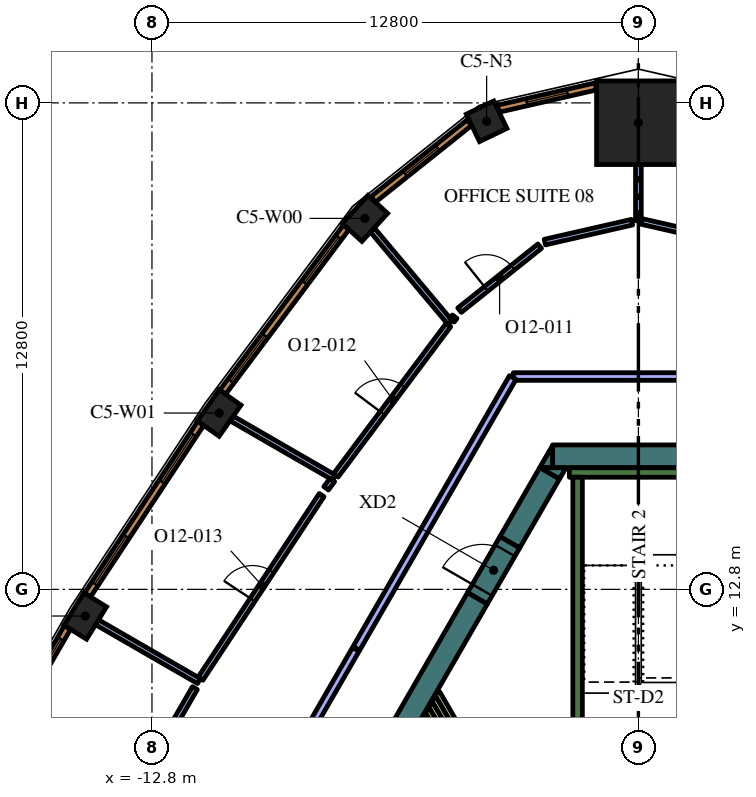
"""IFC4 building model, lengths in metres.
Left out: names, types, materials, properties, quantities, classifications, styles, units other than length and angle.
Written with IfcOpenShell. Run it as: python <this file> out.ifc"""

import sys

from ifc_helpers import new_model, si_unit, direction, frame, frame_2d, origin, origin_2d, place, context, subcontext, project, spatial, polyline, rectangle, outline, extrude, element, fill, save


model = new_model("IFC4")
c1 = context("Model", 3, precision=1e-05, world=origin(), true_north=direction((0.0, 1.0)))
c2 = subcontext(c1, "Body", "Model", "MODEL_VIEW")
j1 = project(units=[si_unit("LENGTHUNIT", "METRE"), si_unit("PLANEANGLEUNIT", "RADIAN")], contexts=[c1])
p1 = place(None, origin())
s1 = spatial("IfcSite", under=j1, at=p1, CompositionType="ELEMENT")
p2 = place(p1, origin())
s2 = spatial("IfcBuilding", under=s1, at=p2, CompositionType="ELEMENT")
p3 = place(p2, frame((0.0, 0.0, 279.6)))
s3 = spatial("IfcBuildingStorey", under=s2, at=p3, CompositionType="ELEMENT", Elevation=279.6)
p4 = place(p3, frame((0.0, 25.078, 0.0), z_axis=(0.0, 0.0, 1.0), x_axis=(0.0, 1.0, 0.0)))
e1 = element("IfcColumn", 1, at=p4, inside=s3, PredefinedType="COLUMN", context=c2, shape_type="SweptSolid", body=[
    extrude(rectangle(XDim=2.2, YDim=2.2, at=origin_2d()), origin(), (0.0, 0.0, 1.0), 4.2),
])
p5 = place(p3, frame((-3.993, 25.116, 0.0), z_axis=(0.0, 0.0, 1.0), x_axis=(-0.900873321869, -0.434082086644, 0.0)))
e2 = element("IfcColumn", 2, at=p5, inside=s3, PredefinedType="COLUMN", context=c2, shape_type="SweptSolid", body=[
    extrude(rectangle(XDim=0.8, YDim=0.8, at=origin_2d()), origin(), (0.0, 0.0, 1.0), 4.2),
])
for number, where, z_axis, x_axis in (
    (3, (-7.195, 22.561, 0.0), (0.0, 0.0, 1.0), (-0.676, -0.737, 0.0)),
    (4, (-11.032, 17.44, 0.0), (0.0, 0.0, 1.0), (-0.575, -0.818, 0.0)),
    (5, (-14.556, 12.098, 0.0), (0.0, 0.0, 1.0), (-0.526, -0.851, 0.0)),
):
    element("IfcColumn", number, at=place(p3, frame(where, z_axis=z_axis, x_axis=x_axis)), inside=s3, PredefinedType="COLUMN", context=c2, shape_type="SweptSolid", body=[
        extrude(rectangle(XDim=1.0, YDim=0.7, at=origin_2d()), origin(), (0.0, 0.0, 1.0), 4.2),
    ])
p6 = place(p3, frame((-2.258, 16.3, 0.0), z_axis=(0.0, 0.0, 1.0), x_axis=(1.0, 0.0, 0.0)))
e6 = element("IfcWall", 6, at=p6, inside=s3, PredefinedType="SOLIDWALL", context=c2, shape_type="SweptSolid", body=[
    extrude(rectangle(XDim=3.823, YDim=0.6, at=frame_2d((1.912, 0.0))), origin(), (0.0, 0.0, 1.0), 4.2),
])
p7 = place(p3, origin())
e7 = element("IfcWall", 7, at=p7, inside=s3, PredefinedType="SOLIDWALL", context=c2, shape_type="SweptSolid", body=[
    extrude(outline(polyline([(-2.598, 16.0), (-2.26, 16.585), (-2.26, 16.0), (-2.598, 16.0)])), origin(), (0.0, 0.0, 1.0), 4.2),
])
p8 = place(p3, frame((-2.335, 15.855, 0.0), z_axis=(0.0, 0.0, 1.0), x_axis=(-0.499980971027, -0.866036389889, 0.0)))
e8 = element("IfcWall", 8, at=p8, inside=s3, PredefinedType="SOLIDWALL", context=c2, shape_type="SweptSolid", body=[
    extrude(rectangle(XDim=2.098, YDim=0.6, at=frame_2d((1.049, 0.0))), origin(), (0.0, 0.0, 1.0), 4.2),
])
e9 = element("IfcWall", 9, at=p7, inside=s3, PredefinedType="SOLIDWALL", context=c2, shape_type="SweptSolid", body=[
    extrude(outline(polyline([(-1.905, 16.0), (-2.074, 15.707), (-2.581, 16.0), (-1.905, 16.0)])), origin(), (0.0, 0.0, 1.0), 4.2),
])
p9 = place(p3, frame((-4.234, 12.566, 0.0), z_axis=(0.0, 0.0, 1.0), x_axis=(-0.499998841866, -0.866026072432, 0.0)))
e10 = element("IfcWall", 10, at=p9, inside=s3, PredefinedType="SOLIDWALL", context=c2, shape_type="SweptSolid", body=[
    extrude(rectangle(XDim=16.694, YDim=0.6, at=frame_2d((8.347, 0.0))), origin(), (0.0, 0.0, 1.0), 4.2),
])
p10 = place(p3, frame((-1.817, 15.875, 0.0), z_axis=(0.0, 0.0, 1.0), x_axis=(1.0, 0.0, 0.0)))
e11 = element("IfcWall", 11, at=p10, inside=s3, PredefinedType="SOLIDWALL", context=c2, shape_type="SweptSolid", body=[
    extrude(rectangle(XDim=3.634, YDim=0.25, at=frame_2d((1.817, 0.0))), origin(), (0.0, 0.0, 1.0), 4.2),
])
p11 = place(p3, frame((-1.6, 8.7, 0.0), z_axis=(0.0, 0.0, 1.0), x_axis=(0.0, 1.0, 0.0)))
e12 = element("IfcWall", 12, at=p11, inside=s3, PredefinedType="SOLIDWALL", context=c2, shape_type="SweptSolid", body=[
    extrude(rectangle(XDim=7.05, YDim=0.25, at=frame_2d((3.525, 0.0))), origin(), (0.0, 0.0, 1.0), 4.2),
])
p12 = place(p3, frame((-5.294, 10.067, 0.0), z_axis=(0.0, 0.0, 1.0), x_axis=(0.500054140411, -0.865994143547, 0.0)))
e13 = element("IfcWall", 13, at=p12, inside=s3, PredefinedType="PARTITIONING", context=c2, shape_type="SweptSolid", body=[
    extrude(rectangle(XDim=1.529, YDim=0.15, at=frame_2d((0.765, 0.0))), origin(), (0.0, 0.0, 1.0), 3.55),
])
p13 = place(p3, frame((-5.381, 9.917, 0.0), z_axis=(0.0, 0.0, 1.0), x_axis=(0.500136970483, -0.865946309396, 0.0)))
e14 = element("IfcWall", 14, at=p13, inside=s3, PredefinedType="PARTITIONING", context=c2, shape_type="SweptSolid", body=[
    extrude(rectangle(XDim=1.359, YDim=0.15, at=frame_2d((0.68, 0.0))), origin(), (0.0, 0.0, 1.0), 3.55),
])
p14 = place(p3, frame((-5.467, 9.767, 0.0), z_axis=(0.0, 0.0, 1.0), x_axis=(0.500168849293, -0.86592789665, 0.0)))
e15 = element("IfcWall", 15, at=p14, inside=s3, PredefinedType="PARTITIONING", context=c2, shape_type="SweptSolid", body=[
    extrude(rectangle(XDim=1.01, YDim=0.15, at=frame_2d((0.505, 0.0))), origin(), (0.0, 0.0, 1.0), 3.55),
])
p15 = place(p3, frame((-5.554, 9.617, 0.0), z_axis=(0.0, 0.0, 1.0), x_axis=(0.500253084543, -0.86587923604, 0.0)))
e16 = element("IfcWall", 16, at=p15, inside=s3, PredefinedType="PARTITIONING", context=c2, shape_type="SweptSolid", body=[
    extrude(rectangle(XDim=0.664, YDim=0.15, at=frame_2d((0.332, 0.0))), origin(), (0.0, 0.0, 1.0), 3.55),
])
p16 = place(p3, frame((-5.64, 9.467, 0.0), z_axis=(0.0, 0.0, 1.0), x_axis=(0.499944387978, -0.86605750902, 0.0)))
e17 = element("IfcWall", 17, at=p16, inside=s3, PredefinedType="PARTITIONING", context=c2, shape_type="SweptSolid", body=[
    extrude(rectangle(XDim=0.317, YDim=0.15, at=frame_2d((0.159, 0.0))), origin(), (0.0, 0.0, 1.0), 3.55),
])
p17 = place(p3, frame((-4.234, 12.566, 0.0), z_axis=(0.0, 0.0, 1.0), x_axis=(0.500000056704, 0.866025371046, 0.0)))
e18 = element("IfcWall", 18, at=p17, inside=s3, PredefinedType="SOLIDWALL", context=c2, shape_type="SweptSolid", body=[
    extrude(rectangle(XDim=1.7, YDim=0.6, at=frame_2d((0.85, 0.0))), origin(), (0.0, 0.0, 1.0), 4.2),
])
p18 = place(p17, frame((0.25, 0.0, 0.0)))
e19 = element("IfcOpeningElement", 19, at=p18, cuts=e18, PredefinedType="OPENING", context=c2, shape_type="SweptSolid", body=[
    extrude(rectangle(XDim=1.2, YDim=2.1, at=frame_2d((0.6, 1.05))), frame((0.0, 0.31, 0.0), z_axis=(0.0, -1.0, 0.0), x_axis=(1.0, 0.0, 0.0)), (0.0, 0.0, 1.0), 0.62),
])
p19 = place(p3, frame((0.0, 22.5, 0.0), z_axis=(0.0, 0.0, 1.0), x_axis=(0.0, 1.0, 0.0)))
e20 = element("IfcWall", 20, at=p19, inside=s3, PredefinedType="PARTITIONING", context=c2, shape_type="SweptSolid", body=[
    extrude(rectangle(XDim=1.479, YDim=0.15, at=frame_2d((0.739, 0.0))), origin(), (0.0, 0.0, 1.0), 3.55),
])
p20 = place(p3, frame((2.293, 21.976, 0.0), z_axis=(0.0, 0.0, 1.0), x_axis=(-0.974905760283, 0.22261796551, 0.0)))
e21 = element("IfcWall", 21, at=p20, inside=s3, PredefinedType="PARTITIONING", context=c2, shape_type="SweptSolid", body=[
    extrude(rectangle(XDim=2.276, YDim=0.15, at=frame_2d((1.138, 0.0))), origin(), (0.0, 0.0, 1.0), 3.55),
])
p21 = place(p3, frame((-4.952, 19.817, 0.0), z_axis=(0.0, 0.0, 1.0), x_axis=(-0.643023053688, 0.765846820471, 0.0)))
e22 = element("IfcWall", 22, at=p21, inside=s3, PredefinedType="PARTITIONING", context=c2, shape_type="SweptSolid", body=[
    extrude(rectangle(XDim=3.184, YDim=0.15, at=frame_2d((1.592, 0.0))), origin(), (0.0, 0.0, 1.0), 3.55),
])
p22 = place(p3, frame((-0.168, 22.461, 0.0), z_axis=(0.0, 0.0, 1.0), x_axis=(-0.974885550769, -0.222706450069, 0.0)))
e23 = element("IfcWall", 23, at=p22, inside=s3, PredefinedType="PARTITIONING", context=c2, shape_type="SweptSolid", body=[
    extrude(rectangle(XDim=2.353, YDim=0.15, at=frame_2d((1.176, 0.0))), origin(), (0.0, 0.0, 1.0), 3.55),
])
p23 = place(p3, frame((-4.706, 20.146, 0.0), z_axis=(0.0, 0.0, 1.0), x_axis=(0.781592149204, 0.623789798172, 0.0)))
e24 = element("IfcWall", 24, at=p23, inside=s3, PredefinedType="PARTITIONING", context=c2, shape_type="SweptSolid", body=[
    extrude(rectangle(XDim=2.698, YDim=0.15, at=frame_2d((1.349, 0.0))), origin(), (0.0, 0.0, 1.0), 3.55),
])
p24 = place(p23, frame((0.898, 0.0, 0.0)))
e25 = element("IfcOpeningElement", 25, at=p24, cuts=e24, PredefinedType="OPENING", context=c2, shape_type="SweptSolid", body=[
    extrude(rectangle(XDim=0.9, YDim=2.1, at=frame_2d((0.45, 1.05))), frame((0.0, 0.085, 0.0), z_axis=(0.0, -1.0, 0.0), x_axis=(1.0, 0.0, 0.0)), (0.0, 0.0, 1.0), 0.17),
])
p25 = place(p3, frame((-4.834, 19.975, 0.0), z_axis=(0.0, 0.0, 1.0), x_axis=(-0.599349659863, -0.800487342325, 0.0)))
e26 = element("IfcWall", 26, at=p25, inside=s3, PredefinedType="PARTITIONING", context=c2, shape_type="SweptSolid", body=[
    extrude(rectangle(XDim=0.12, YDim=0.15, at=frame_2d((0.06, 0.0))), origin(), (0.0, 0.0, 1.0), 3.55),
])
p26 = place(p3, frame((-8.007, 15.74, 0.0), z_axis=(0.0, 0.0, 1.0), x_axis=(-0.866044607523, 0.499966736674, 0.0)))
e27 = element("IfcWall", 27, at=p26, inside=s3, PredefinedType="PARTITIONING", context=c2, shape_type="SweptSolid", body=[
    extrude(rectangle(XDim=3.115, YDim=0.15, at=frame_2d((1.557, 0.0))), origin(), (0.0, 0.0, 1.0), 3.55),
])
p27 = place(p3, frame((-7.962, 15.8, 0.0), z_axis=(0.0, 0.0, 1.0), x_axis=(0.599541489613, 0.800343677574, 0.0)))
e28 = element("IfcWall", 28, at=p27, inside=s3, PredefinedType="PARTITIONING", context=c2, shape_type="SweptSolid", body=[
    extrude(rectangle(XDim=4.942, YDim=0.15, at=frame_2d((2.471, 0.0))), origin(), (0.0, 0.0, 1.0), 3.55),
])
p28 = place(p27, frame((2.042, 0.0, 0.0)))
e29 = element("IfcOpeningElement", 29, at=p28, cuts=e28, PredefinedType="OPENING", context=c2, shape_type="SweptSolid", body=[
    extrude(rectangle(XDim=0.9, YDim=2.1, at=frame_2d((0.45, 1.05))), frame((0.0, 0.085, 0.0), z_axis=(0.0, -1.0, 0.0), x_axis=(1.0, 0.0, 0.0)), (0.0, 0.0, 1.0), 0.17),
])
p29 = place(p3, frame((-11.564, 10.387, 0.0), z_axis=(0.0, 0.0, 1.0), x_axis=(-0.86604641216, 0.499963610661, 0.0)))
e30 = element("IfcWall", 30, at=p29, inside=s3, PredefinedType="PARTITIONING", context=c2, shape_type="SweptSolid", body=[
    extrude(rectangle(XDim=3.096, YDim=0.15, at=frame_2d((1.548, 0.0))), origin(), (0.0, 0.0, 1.0), 3.55),
])
p30 = place(p3, frame((-8.052, 15.679, 0.0), z_axis=(0.0, 0.0, 1.0), x_axis=(-0.599004157744, -0.800745914136, 0.0)))
e31 = element("IfcWall", 31, at=p30, inside=s3, PredefinedType="PARTITIONING", context=c2, shape_type="SweptSolid", body=[
    extrude(rectangle(XDim=0.275, YDim=0.15, at=frame_2d((0.137, 0.0))), origin(), (0.0, 0.0, 1.0), 3.55),
])
p31 = place(p3, frame((-11.523, 10.449, 0.0), z_axis=(0.0, 0.0, 1.0), x_axis=(0.550751709023, 0.834669129061, 0.0)))
e32 = element("IfcWall", 32, at=p31, inside=s3, PredefinedType="PARTITIONING", context=c2, shape_type="SweptSolid", body=[
    extrude(rectangle(XDim=5.788, YDim=0.15, at=frame_2d((2.894, 0.0))), origin(), (0.0, 0.0, 1.0), 3.55),
])
p32 = place(p31, frame((2.488, 0.0, 0.0)))
e33 = element("IfcOpeningElement", 33, at=p32, cuts=e32, PredefinedType="OPENING", context=c2, shape_type="SweptSolid", body=[
    extrude(rectangle(XDim=0.9, YDim=2.1, at=frame_2d((0.45, 1.05))), frame((0.0, 0.085, 0.0), z_axis=(0.0, -1.0, 0.0), x_axis=(1.0, 0.0, 0.0)), (0.0, 0.0, 1.0), 0.17),
])
p33 = place(p3, frame((-14.74, 4.887, 0.0), z_axis=(0.0, 0.0, 1.0), x_axis=(0.500007141444, 0.86602128063, 0.0)))
e34 = element("IfcWall", 34, at=p33, inside=s3, PredefinedType="PARTITIONING", context=c2, shape_type="SweptSolid", body=[
    extrude(rectangle(XDim=6.137, YDim=0.15, at=frame_2d((3.068, 0.0))), origin(), (0.0, 0.0, 1.0), 3.55),
])
p34 = place(p33, frame((2.637, 0.0, 0.0)))
e35 = element("IfcOpeningElement", 35, at=p34, cuts=e34, PredefinedType="OPENING", context=c2, shape_type="SweptSolid", body=[
    extrude(rectangle(XDim=0.9, YDim=2.1, at=frame_2d((0.45, 1.05))), frame((0.0, 0.085, 0.0), z_axis=(0.0, -1.0, 0.0), x_axis=(1.0, 0.0, 0.0)), (0.0, 0.0, 1.0), 0.17),
])
p35 = place(p3, frame((-7.436, 11.221, 0.0), z_axis=(0.0, 0.0, 1.0), x_axis=(-0.49999894854, -0.866026010844, 0.0)))
e36 = element("IfcWall", 36, at=p35, inside=s3, PredefinedType="PARTITIONING", context=c2, shape_type="SweptSolid", body=[
    extrude(rectangle(XDim=12.0, YDim=0.2, at=frame_2d((6.0, 0.0))), origin(), (0.0, 0.0, 1.0), 3.55),
])
p36 = place(p35, frame((5.5, 0.0, 0.0)))
e37 = element("IfcOpeningElement", 37, at=p36, cuts=e36, PredefinedType="OPENING", context=c2, shape_type="SweptSolid", body=[
    extrude(rectangle(XDim=1.0, YDim=2.1, at=frame_2d((0.5, 1.05))), frame((0.0, 0.11, 0.0), z_axis=(0.0, -1.0, 0.0), x_axis=(1.0, 0.0, 0.0)), (0.0, 0.0, 1.0), 0.22),
])
p37 = place(p3, frame((3.291, 18.4, 0.0), z_axis=(0.0, 0.0, 1.0), x_axis=(-1.0, 0.0, 0.0)))
e38 = element("IfcWall", 38, at=p37, inside=s3, PredefinedType="PARTITIONING", context=c2, shape_type="SweptSolid", body=[
    extrude(rectangle(XDim=6.582, YDim=0.2, at=frame_2d((3.291, 0.0))), origin(), (0.0, 0.0, 1.0), 3.55),
])
p38 = place(p3, frame((-3.306, 18.374, 0.0), z_axis=(0.0, 0.0, 1.0), x_axis=(-0.499999798456, -0.866025520146, 0.0)))
e39 = element("IfcWall", 39, at=p38, inside=s3, PredefinedType="PARTITIONING", context=c2, shape_type="SweptSolid", body=[
    extrude(rectangle(XDim=8.229, YDim=0.2, at=frame_2d((4.115, 0.0))), origin(), (0.0, 0.0, 1.0), 3.55),
])
p39 = place(p3, frame((-1.122, 26.033, 0.0), z_axis=(0.0, 0.0, 1.0), x_axis=(-0.974913273386, -0.222585060988, 0.0)))
e40 = element("IfcWall", 40, at=p39, inside=s3, PredefinedType="SOLIDWALL", context=c2, shape_type="SweptSolid", body=[
    extrude(rectangle(XDim=2.627, YDim=0.19, at=frame_2d((1.313, 0.0))), origin(), (0.0, 0.0, 1.0), 3.95),
])
p40 = place(p39, frame((0.763, 0.0, 0.6)))
e41 = element("IfcOpeningElement", 41, at=p40, cuts=e40, PredefinedType="OPENING", context=c2, shape_type="SweptSolid", body=[
    extrude(rectangle(XDim=1.1, YDim=2.85, at=frame_2d((0.55, 1.425))), frame((0.0, 0.105, 0.0), z_axis=(0.0, -1.0, 0.0), x_axis=(1.0, 0.0, 0.0)), (0.0, 0.0, 1.0), 0.21),
])
p41 = place(p3, frame((-4.448, 25.08, 0.0), z_axis=(0.0, 0.0, 1.0), x_axis=(-0.781626234064, -0.623747088349, 0.0)))
e42 = element("IfcWall", 42, at=p41, inside=s3, PredefinedType="SOLIDWALL", context=c2, shape_type="SweptSolid", body=[
    extrude(rectangle(XDim=3.237, YDim=0.19, at=frame_2d((1.618, 0.0))), origin(), (0.0, 0.0, 1.0), 3.95),
])
p42 = place(p41, frame((1.068, 0.0, 0.6)))
e43 = element("IfcOpeningElement", 43, at=p42, cuts=e42, PredefinedType="OPENING", context=c2, shape_type="SweptSolid", body=[
    extrude(rectangle(XDim=1.1, YDim=2.85, at=frame_2d((0.55, 1.425))), frame((0.0, 0.105, 0.0), z_axis=(0.0, -1.0, 0.0), x_axis=(1.0, 0.0, 0.0)), (0.0, 0.0, 1.0), 0.21),
])
p43 = place(p3, frame((-7.692, 22.324, 0.0), z_axis=(0.0, 0.0, 1.0), x_axis=(-0.599559865294, -0.800329911929, 0.0)))
e44 = element("IfcWall", 44, at=p43, inside=s3, PredefinedType="SOLIDWALL", context=c2, shape_type="SweptSolid", body=[
    extrude(rectangle(XDim=5.415, YDim=0.19, at=frame_2d((2.708, 0.0))), origin(), (0.0, 0.0, 1.0), 3.95),
])
p44 = place(p43, frame((0.323, 0.0, 0.6)))
e45 = element("IfcOpeningElement", 45, at=p44, cuts=e44, PredefinedType="OPENING", context=c2, shape_type="SweptSolid", body=[
    extrude(rectangle(XDim=1.5, YDim=2.85, at=frame_2d((0.75, 1.425))), frame((0.0, 0.105, 0.0), z_axis=(0.0, -1.0, 0.0), x_axis=(1.0, 0.0, 0.0)), (0.0, 0.0, 1.0), 0.21),
])
p45 = place(p43, frame((3.558, 0.0, 0.6)))
e46 = element("IfcOpeningElement", 46, at=p45, cuts=e44, PredefinedType="OPENING", context=c2, shape_type="SweptSolid", body=[
    extrude(rectangle(XDim=1.5, YDim=2.85, at=frame_2d((0.75, 1.425))), frame((0.0, 0.105, 0.0), z_axis=(0.0, -1.0, 0.0), x_axis=(1.0, 0.0, 0.0)), (0.0, 0.0, 1.0), 0.21),
])
p46 = place(p3, frame((-11.518, 17.166, 0.0), z_axis=(0.0, 0.0, 1.0), x_axis=(-0.550744054781, -0.83467417962, 0.0)))
e47 = element("IfcWall", 47, at=p46, inside=s3, PredefinedType="SOLIDWALL", context=c2, shape_type="SweptSolid", body=[
    extrude(rectangle(XDim=5.406, YDim=0.19, at=frame_2d((2.703, 0.0))), origin(), (0.0, 0.0, 1.0), 3.95),
])
p47 = place(p46, frame((0.346, 0.0, 0.6)))
e48 = element("IfcOpeningElement", 48, at=p47, cuts=e47, PredefinedType="OPENING", context=c2, shape_type="SweptSolid", body=[
    extrude(rectangle(XDim=1.5, YDim=2.85, at=frame_2d((0.75, 1.425))), frame((0.0, 0.105, 0.0), z_axis=(0.0, -1.0, 0.0), x_axis=(1.0, 0.0, 0.0)), (0.0, 0.0, 1.0), 0.21),
])
p48 = place(p46, frame((3.559, 0.0, 0.6)))
e49 = element("IfcOpeningElement", 49, at=p48, cuts=e47, PredefinedType="OPENING", context=c2, shape_type="SweptSolid", body=[
    extrude(rectangle(XDim=1.5, YDim=2.85, at=frame_2d((0.75, 1.425))), frame((0.0, 0.105, 0.0), z_axis=(0.0, -1.0, 0.0), x_axis=(1.0, 0.0, 0.0)), (0.0, 0.0, 1.0), 0.21),
])
p49 = place(p3, frame((-15.025, 11.796, 0.0), z_axis=(0.0, 0.0, 1.0), x_axis=(-0.500024767483, -0.866011103799, 0.0)))
e50 = element("IfcWall", 50, at=p49, inside=s3, PredefinedType="SOLIDWALL", context=c2, shape_type="SweptSolid", body=[
    extrude(rectangle(XDim=5.406, YDim=0.19, at=frame_2d((2.703, 0.0))), origin(), (0.0, 0.0, 1.0), 3.95),
])
p50 = place(p49, frame((0.346, 0.0, 0.6)))
e51 = element("IfcOpeningElement", 51, at=p50, cuts=e50, PredefinedType="OPENING", context=c2, shape_type="SweptSolid", body=[
    extrude(rectangle(XDim=1.5, YDim=2.85, at=frame_2d((0.75, 1.425))), frame((0.0, 0.105, 0.0), z_axis=(0.0, -1.0, 0.0), x_axis=(1.0, 0.0, 0.0)), (0.0, 0.0, 1.0), 0.21),
])
p51 = place(p49, frame((3.559, 0.0, 0.6)))
e52 = element("IfcOpeningElement", 52, at=p51, cuts=e50, PredefinedType="OPENING", context=c2, shape_type="SweptSolid", body=[
    extrude(rectangle(XDim=1.5, YDim=2.85, at=frame_2d((0.75, 1.425))), frame((0.0, 0.105, 0.0), z_axis=(0.0, -1.0, 0.0), x_axis=(1.0, 0.0, 0.0)), (0.0, 0.0, 1.0), 0.21),
])
p52 = place(p18, origin())
e53 = element("IfcDoor", 53, at=p52, inside=s3, OperationType="SINGLE_SWING_LEFT", PredefinedType="DOOR", context=c2, shape_type="SweptSolid", body=[
    extrude(rectangle(XDim=1.2, YDim=2.1, at=frame_2d((0.6, 1.05))), frame((0.0, 0.025, 0.0), z_axis=(0.0, -1.0, 0.0), x_axis=(1.0, 0.0, 0.0)), (0.0, 0.0, 1.0), 0.05),
])
fill(e19, e53)
p53 = place(p24, origin())
e54 = element("IfcDoor", 54, at=p53, inside=s3, OperationType="SINGLE_SWING_LEFT", PredefinedType="DOOR", context=c2, shape_type="SweptSolid", body=[
    extrude(rectangle(XDim=0.9, YDim=2.1, at=frame_2d((0.45, 1.05))), frame((0.0, 0.025, 0.0), z_axis=(0.0, -1.0, 0.0), x_axis=(1.0, 0.0, 0.0)), (0.0, 0.0, 1.0), 0.05),
])
fill(e25, e54)
p54 = place(p28, origin())
e55 = element("IfcDoor", 55, at=p54, inside=s3, OperationType="SINGLE_SWING_RIGHT", PredefinedType="DOOR", context=c2, shape_type="SweptSolid", body=[
    extrude(rectangle(XDim=0.9, YDim=2.1, at=frame_2d((0.45, 1.05))), frame((0.0, 0.025, 0.0), z_axis=(0.0, -1.0, 0.0), x_axis=(1.0, 0.0, 0.0)), (0.0, 0.0, 1.0), 0.05),
])
fill(e29, e55)
p55 = place(p32, origin())
e56 = element("IfcDoor", 56, at=p55, inside=s3, OperationType="SINGLE_SWING_RIGHT", PredefinedType="DOOR", context=c2, shape_type="SweptSolid", body=[
    extrude(rectangle(XDim=0.9, YDim=2.1, at=frame_2d((0.45, 1.05))), frame((0.0, 0.025, 0.0), z_axis=(0.0, -1.0, 0.0), x_axis=(1.0, 0.0, 0.0)), (0.0, 0.0, 1.0), 0.05),
])
fill(e33, e56)
p56 = place(p40, origin())
e57 = element("IfcWindow", 57, at=p56, inside=s3, PartitioningType="SINGLE_PANEL", PredefinedType="WINDOW", context=c2, shape_type="SweptSolid", body=[
    extrude(rectangle(XDim=1.1, YDim=2.85, at=frame_2d((0.55, 1.425))), frame((0.0, 0.045, 0.0), z_axis=(0.0, -1.0, 0.0), x_axis=(1.0, 0.0, 0.0)), (0.0, 0.0, 1.0), 0.06),
])
fill(e41, e57)
p57 = place(p42, origin())
e58 = element("IfcWindow", 58, at=p57, inside=s3, PartitioningType="SINGLE_PANEL", PredefinedType="WINDOW", context=c2, shape_type="SweptSolid", body=[
    extrude(rectangle(XDim=1.1, YDim=2.85, at=frame_2d((0.55, 1.425))), frame((0.0, 0.045, 0.0), z_axis=(0.0, -1.0, 0.0), x_axis=(1.0, 0.0, 0.0)), (0.0, 0.0, 1.0), 0.06),
])
fill(e43, e58)
p58 = place(p44, origin())
e59 = element("IfcWindow", 59, at=p58, inside=s3, PartitioningType="SINGLE_PANEL", PredefinedType="WINDOW", context=c2, shape_type="SweptSolid", body=[
    extrude(rectangle(XDim=1.5, YDim=2.85, at=frame_2d((0.75, 1.425))), frame((0.0, 0.045, 0.0), z_axis=(0.0, -1.0, 0.0), x_axis=(1.0, 0.0, 0.0)), (0.0, 0.0, 1.0), 0.06),
])
fill(e45, e59)
p59 = place(p45, origin())
e60 = element("IfcWindow", 60, at=p59, inside=s3, PartitioningType="SINGLE_PANEL", PredefinedType="WINDOW", context=c2, shape_type="SweptSolid", body=[
    extrude(rectangle(XDim=1.5, YDim=2.85, at=frame_2d((0.75, 1.425))), frame((0.0, 0.045, 0.0), z_axis=(0.0, -1.0, 0.0), x_axis=(1.0, 0.0, 0.0)), (0.0, 0.0, 1.0), 0.06),
])
fill(e46, e60)
p60 = place(p47, origin())
e61 = element("IfcWindow", 61, at=p60, inside=s3, PartitioningType="SINGLE_PANEL", PredefinedType="WINDOW", context=c2, shape_type="SweptSolid", body=[
    extrude(rectangle(XDim=1.5, YDim=2.85, at=frame_2d((0.75, 1.425))), frame((0.0, 0.045, 0.0), z_axis=(0.0, -1.0, 0.0), x_axis=(1.0, 0.0, 0.0)), (0.0, 0.0, 1.0), 0.06),
])
fill(e48, e61)
p61 = place(p48, origin())
e62 = element("IfcWindow", 62, at=p61, inside=s3, PartitioningType="SINGLE_PANEL", PredefinedType="WINDOW", context=c2, shape_type="SweptSolid", body=[
    extrude(rectangle(XDim=1.5, YDim=2.85, at=frame_2d((0.75, 1.425))), frame((0.0, 0.045, 0.0), z_axis=(0.0, -1.0, 0.0), x_axis=(1.0, 0.0, 0.0)), (0.0, 0.0, 1.0), 0.06),
])
fill(e49, e62)
p62 = place(p50, origin())
e63 = element("IfcWindow", 63, at=p62, inside=s3, PartitioningType="SINGLE_PANEL", PredefinedType="WINDOW", context=c2, shape_type="SweptSolid", body=[
    extrude(rectangle(XDim=1.5, YDim=2.85, at=frame_2d((0.75, 1.425))), frame((0.0, 0.045, 0.0), z_axis=(0.0, -1.0, 0.0), x_axis=(1.0, 0.0, 0.0)), (0.0, 0.0, 1.0), 0.06),
])
fill(e51, e63)
save(model, sys.argv[1])
